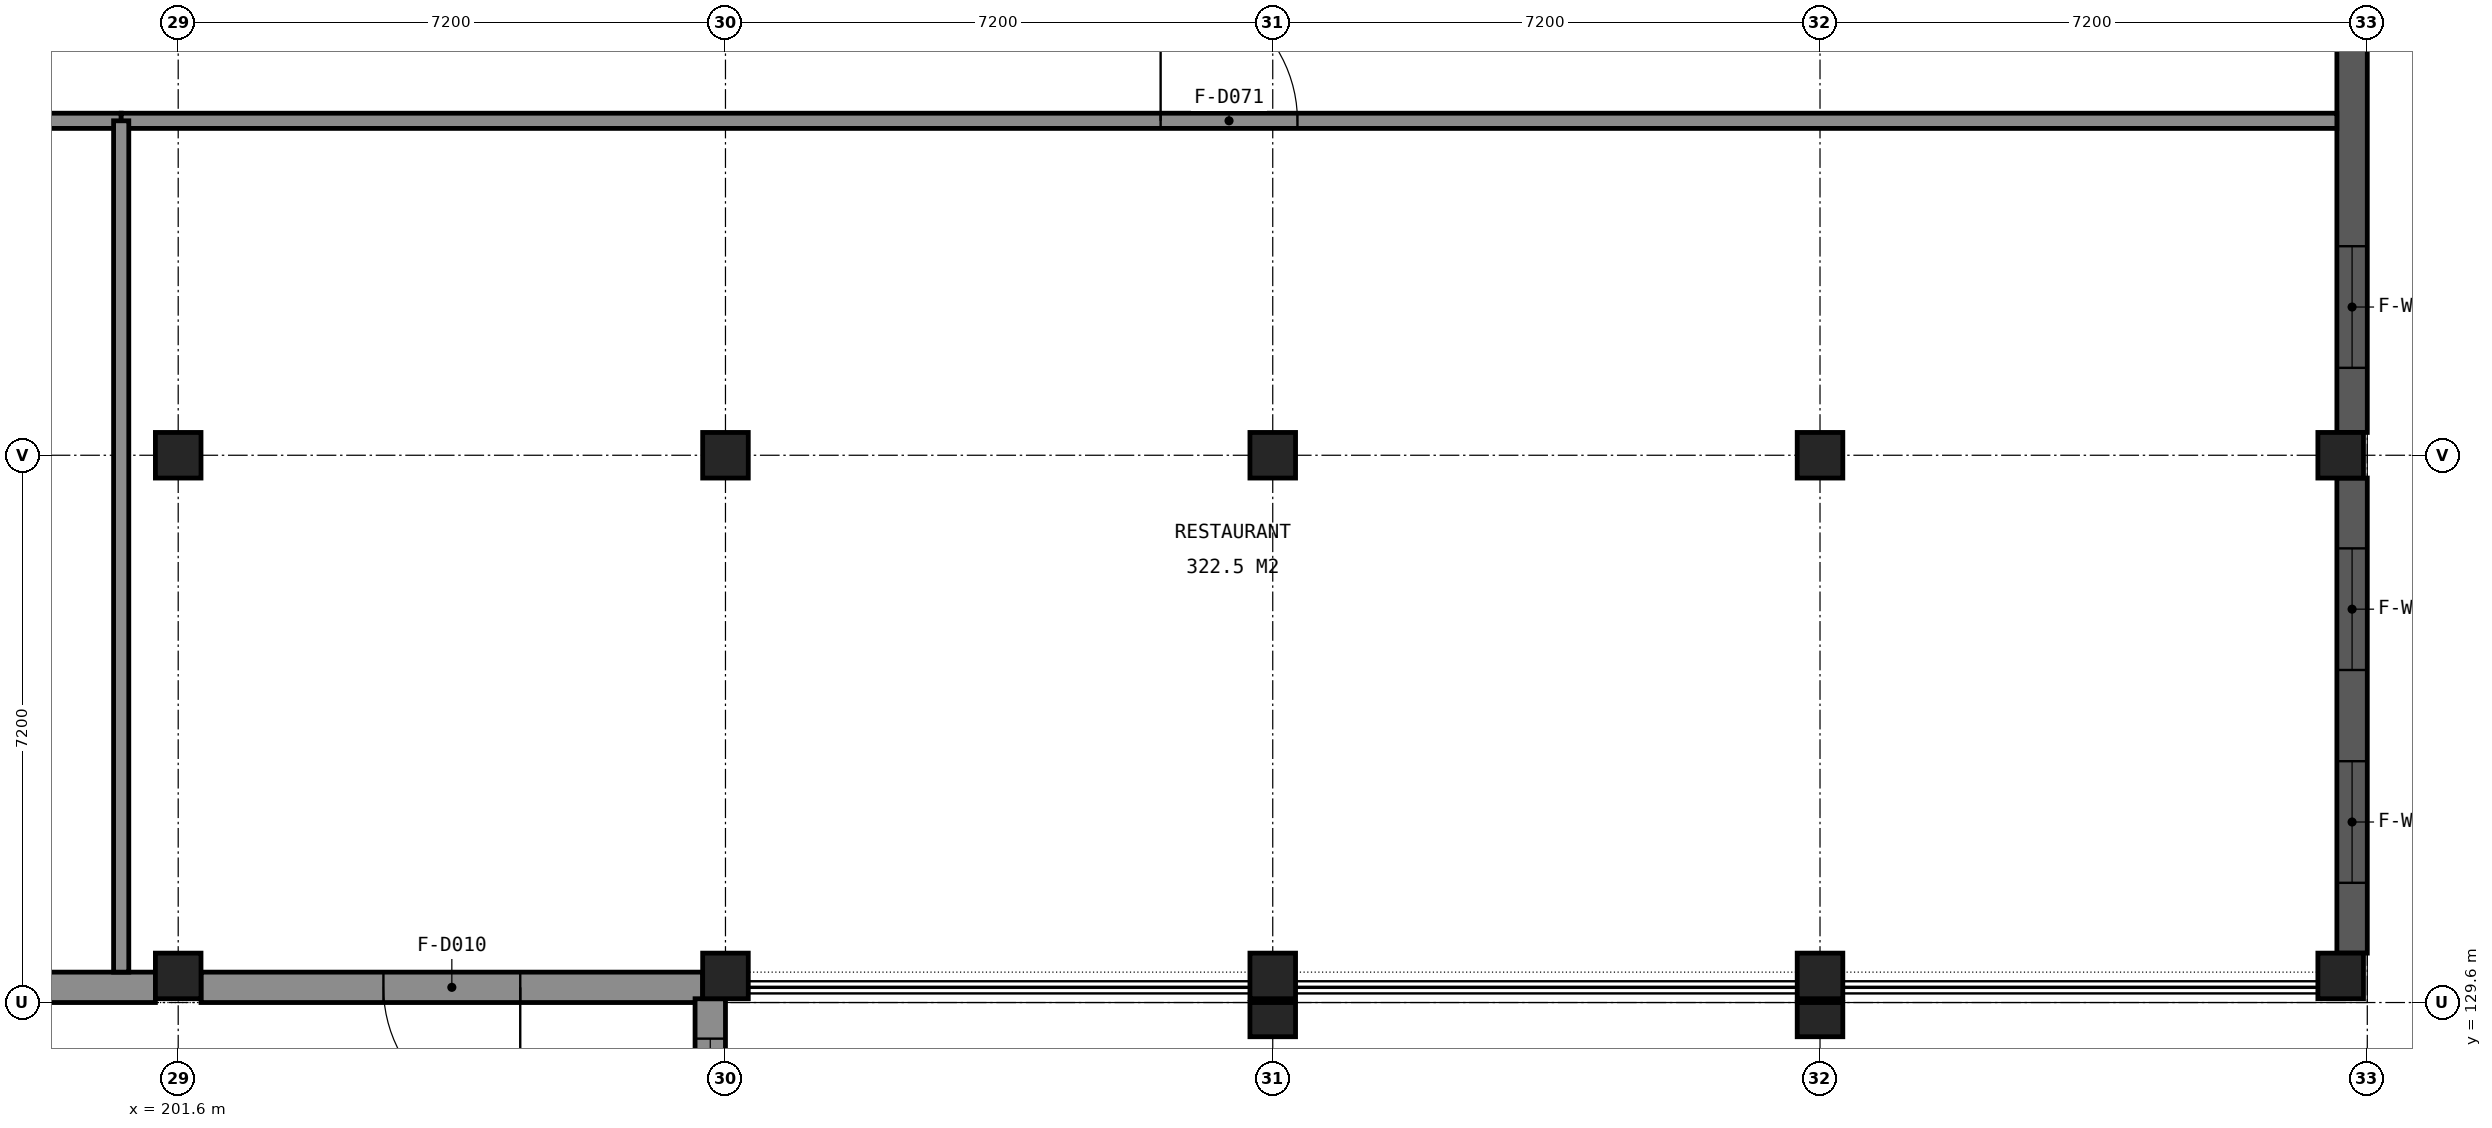
"""IFC4 building model, lengths in metres.
Left out: names, types, materials, properties, quantities, classifications, styles, units other than length and angle.
Written with IfcOpenShell. Run it as: python <this file> out.ifc"""

import sys

from ifc_helpers import new_model, si_unit, direction, frame, frame_2d, origin, origin_2d, place, context, subcontext, project, spatial, rectangle, extrude, element, fill, save


model = new_model("IFC4")
c1 = context("Model", 3, precision=1e-05, world=origin(), true_north=direction((0.0, 1.0)))
c2 = subcontext(c1, "Body", "Model", "MODEL_VIEW")
j1 = project(units=[si_unit("LENGTHUNIT", "METRE"), si_unit("PLANEANGLEUNIT", "RADIAN")], contexts=[c1])
p1 = place(None, origin())
s1 = spatial("IfcSite", under=j1, at=p1, CompositionType="ELEMENT")
p2 = place(p1, origin())
s2 = spatial("IfcBuilding", under=s1, at=p2, CompositionType="ELEMENT")
p3 = place(p2, frame((0.0, 0.0, 9.6)))
s3 = spatial("IfcBuildingStorey", under=s2, at=p3, CompositionType="ELEMENT", Elevation=9.6)
for number, where, z_axis, x_axis in (
    (1, (201.6, 129.95, 0.0), (0.0, 0.0, 1.0), (1.0, 0.0, 0.0)),
    (2, (208.8, 129.95, 0.0), (0.0, 0.0, 1.0), (1.0, 0.0, 0.0)),
    (3, (216.0, 129.95, 0.0), (0.0, 0.0, 1.0), (1.0, 0.0, 0.0)),
    (4, (223.2, 129.95, 0.0), (0.0, 0.0, 1.0), (1.0, 0.0, 0.0)),
    (5, (230.05, 129.95, 0.0), (0.0, 0.0, 1.0), (1.0, 0.0, 0.0)),
    (6, (201.6, 136.8, 0.0), (0.0, 0.0, 1.0), (1.0, 0.0, 0.0)),
    (7, (208.8, 136.8, 0.0), (0.0, 0.0, 1.0), (1.0, 0.0, 0.0)),
    (8, (216.0, 136.8, 0.0), (0.0, 0.0, 1.0), (1.0, 0.0, 0.0)),
    (9, (223.2, 136.8, 0.0), (0.0, 0.0, 1.0), (1.0, 0.0, 0.0)),
    (10, (230.05, 136.8, 0.0), (0.0, 0.0, 1.0), (1.0, 0.0, 0.0)),
):
    element("IfcColumn", number, at=place(p3, frame(where, z_axis=z_axis, x_axis=x_axis)), inside=s3, PredefinedType="COLUMN", context=c2, shape_type="SweptSolid", body=[
        extrude(rectangle(XDim=0.6, YDim=0.6, at=origin_2d()), origin(), (0.0, 0.0, 1.0), 4.8),
    ])
p4 = place(p3, frame((201.3, 129.8, 0.0), z_axis=(0.0, 0.0, 1.0), x_axis=(-1.0, 0.0, 0.0)))
e11 = element("IfcWall", 11, at=p4, inside=s3, PredefinedType="SOLIDWALL", context=c2, shape_type="SweptSolid", body=[
    extrude(rectangle(XDim=6.6, YDim=0.4, at=frame_2d((3.3, 0.0))), origin(), (0.0, 0.0, 1.0), 3.95),
])
p5 = place(p4, frame((2.4, 0.0, 0.0)))
e12 = element("IfcOpeningElement", 12, at=p5, cuts=e11, PredefinedType="OPENING", context=c2, shape_type="SweptSolid", body=[
    extrude(rectangle(XDim=1.8, YDim=2.1, at=frame_2d((0.9, 1.05))), frame((0.0, 0.21, 0.0), z_axis=(0.0, -1.0, 0.0), x_axis=(1.0, 0.0, 0.0)), (0.0, 0.0, 1.0), 0.42),
])
p6 = place(p3, frame((208.5, 129.8, 0.0), z_axis=(0.0, 0.0, 1.0), x_axis=(-1.0, 0.0, 0.0)))
e13 = element("IfcWall", 13, at=p6, inside=s3, PredefinedType="SOLIDWALL", context=c2, shape_type="SweptSolid", body=[
    extrude(rectangle(XDim=6.6, YDim=0.4, at=frame_2d((3.3, 0.0))), origin(), (0.0, 0.0, 1.0), 3.95),
])
p7 = place(p6, frame((2.4, 0.0, 0.0)))
e14 = element("IfcOpeningElement", 14, at=p7, cuts=e13, PredefinedType="OPENING", context=c2, shape_type="SweptSolid", body=[
    extrude(rectangle(XDim=1.8, YDim=2.1, at=frame_2d((0.9, 1.05))), frame((0.0, 0.21, 0.0), z_axis=(0.0, -1.0, 0.0), x_axis=(1.0, 0.0, 0.0)), (0.0, 0.0, 1.0), 0.42),
])
p8 = place(p3, frame((230.2, 136.5, 0.0), z_axis=(0.0, 0.0, 1.0), x_axis=(0.0, -1.0, 0.0)))
e15 = element("IfcWall", 15, at=p8, inside=s3, PredefinedType="SHEAR", context=c2, shape_type="SweptSolid", body=[
    extrude(rectangle(XDim=6.25, YDim=0.4, at=frame_2d((3.125, 0.0))), origin(), (0.0, 0.0, 1.0), 3.95),
])
p9 = place(p8, frame((0.925, 0.0, 0.8)))
e16 = element("IfcOpeningElement", 16, at=p9, cuts=e15, PredefinedType="OPENING", context=c2, shape_type="SweptSolid", body=[
    extrude(rectangle(XDim=1.6, YDim=3.1, at=frame_2d((0.8, 1.55))), frame((0.0, 0.21, 0.0), z_axis=(0.0, -1.0, 0.0), x_axis=(1.0, 0.0, 0.0)), (0.0, 0.0, 1.0), 0.42),
])
p10 = place(p8, frame((3.725, 0.0, 0.8)))
e17 = element("IfcOpeningElement", 17, at=p10, cuts=e15, PredefinedType="OPENING", context=c2, shape_type="SweptSolid", body=[
    extrude(rectangle(XDim=1.6, YDim=3.1, at=frame_2d((0.8, 1.55))), frame((0.0, 0.21, 0.0), z_axis=(0.0, -1.0, 0.0), x_axis=(1.0, 0.0, 0.0)), (0.0, 0.0, 1.0), 0.42),
])
p11 = place(p3, frame((230.2, 143.2, 0.0), z_axis=(0.0, 0.0, 1.0), x_axis=(0.0, -1.0, 0.0)))
e18 = element("IfcWall", 18, at=p11, inside=s3, PredefinedType="SHEAR", context=c2, shape_type="SweptSolid", body=[
    extrude(rectangle(XDim=6.1, YDim=0.4, at=frame_2d((3.05, 0.0))), origin(), (0.0, 0.0, 1.0), 3.95),
])
p12 = place(p11, frame((3.65, 0.0, 0.8)))
e19 = element("IfcOpeningElement", 19, at=p12, cuts=e18, PredefinedType="OPENING", context=c2, shape_type="SweptSolid", body=[
    extrude(rectangle(XDim=1.6, YDim=3.1, at=frame_2d((0.8, 1.55))), frame((0.0, 0.21, 0.0), z_axis=(0.0, -1.0, 0.0), x_axis=(1.0, 0.0, 0.0)), (0.0, 0.0, 1.0), 0.42),
])
for number, where, z_axis, x_axis in (
    (20, (216.0, 129.375, 0.0), (0.0, 0.0, 1.0), (1.0, 0.0, 0.0)),
    (21, (223.2, 129.375, 0.0), (0.0, 0.0, 1.0), (1.0, 0.0, 0.0)),
):
    element("IfcColumn", number, at=place(p3, frame(where, z_axis=z_axis, x_axis=x_axis)), inside=s3, PredefinedType="PILASTER", context=c2, shape_type="SweptSolid", body=[
        extrude(rectangle(XDim=0.6, YDim=0.45, at=origin_2d()), origin(), (0.0, 0.0, 1.0), 4.8),
    ])
p13 = place(p3, frame((208.6, 129.65, 0.0), z_axis=(0.0, 0.0, 1.0), x_axis=(0.0, -1.0, 0.0)))
e22 = element("IfcWall", 22, at=p13, inside=s3, PredefinedType="SOLIDWALL", context=c2, shape_type="SweptSolid", body=[
    extrude(rectangle(XDim=2.65, YDim=0.4, at=frame_2d((1.325, 0.0))), origin(), (0.0, 0.0, 1.0), 4.55),
])
p14 = place(p13, frame((0.525, 0.0, 0.8)))
e23 = element("IfcOpeningElement", 23, at=p14, cuts=e22, PredefinedType="OPENING", context=c2, shape_type="SweptSolid", body=[
    extrude(rectangle(XDim=1.6, YDim=3.1, at=frame_2d((0.8, 1.55))), frame((0.0, 0.21, 0.0), z_axis=(0.0, -1.0, 0.0), x_axis=(1.0, 0.0, 0.0)), (0.0, 0.0, 1.0), 0.42),
])
p15 = place(p3, frame((158.8, 141.2, 0.0), z_axis=(0.0, 0.0, 1.0), x_axis=(1.0, 0.0, 0.0)))
e24 = element("IfcWall", 24, at=p15, inside=s3, PredefinedType="PARTITIONING", context=c2, shape_type="SweptSolid", body=[
    extrude(rectangle(XDim=42.05, YDim=0.2, at=frame_2d((21.025, 0.0))), origin(), (0.0, 0.0, 1.0), 3.95),
])
p16 = place(p15, frame((20.125, 0.0, 0.0)))
e25 = element("IfcOpeningElement", 25, at=p16, cuts=e24, PredefinedType="OPENING", context=c2, shape_type="SweptSolid", body=[
    extrude(rectangle(XDim=1.8, YDim=2.1, at=frame_2d((0.9, 1.05))), frame((0.0, 0.11, 0.0), z_axis=(0.0, -1.0, 0.0), x_axis=(1.0, 0.0, 0.0)), (0.0, 0.0, 1.0), 0.22),
])
p17 = place(p3, frame((200.85, 141.2, 0.0), z_axis=(0.0, 0.0, 1.0), x_axis=(1.0, 0.0, 0.0)))
e26 = element("IfcWall", 26, at=p17, inside=s3, PredefinedType="PARTITIONING", context=c2, shape_type="SweptSolid", body=[
    extrude(rectangle(XDim=29.15, YDim=0.2, at=frame_2d((14.575, 0.0))), origin(), (0.0, 0.0, 1.0), 3.95),
])
p18 = place(p17, frame((13.675, 0.0, 0.0)))
e27 = element("IfcOpeningElement", 27, at=p18, cuts=e26, PredefinedType="OPENING", context=c2, shape_type="SweptSolid", body=[
    extrude(rectangle(XDim=1.8, YDim=2.1, at=frame_2d((0.9, 1.05))), frame((0.0, 0.11, 0.0), z_axis=(0.0, -1.0, 0.0), x_axis=(1.0, 0.0, 0.0)), (0.0, 0.0, 1.0), 0.22),
])
p19 = place(p3, frame((200.85, 130.0, 0.0), z_axis=(0.0, 0.0, 1.0), x_axis=(0.0, 1.0, 0.0)))
e28 = element("IfcWall", 28, at=p19, inside=s3, PredefinedType="PARTITIONING", context=c2, shape_type="SweptSolid", body=[
    extrude(rectangle(XDim=11.2, YDim=0.2, at=frame_2d((5.6, 0.0))), origin(), (0.0, 0.0, 1.0), 3.95),
])
p20 = place(p7, origin())
e29 = element("IfcDoor", 29, at=p20, inside=s3, OperationType="NOTDEFINED", PredefinedType="DOOR", context=c2, shape_type="SweptSolid", body=[
    extrude(rectangle(XDim=1.8, YDim=2.1, at=frame_2d((0.9, 1.05))), frame((0.0, 0.025, 0.0), z_axis=(0.0, -1.0, 0.0), x_axis=(1.0, 0.0, 0.0)), (0.0, 0.0, 1.0), 0.05),
])
fill(e14, e29)
p21 = place(p9, origin())
e30 = element("IfcWindow", 30, at=p21, inside=s3, PartitioningType="SINGLE_PANEL", PredefinedType="WINDOW", context=c2, shape_type="SweptSolid", body=[
    extrude(rectangle(XDim=1.6, YDim=3.1, at=frame_2d((0.8, 1.55))), frame((0.0, -0.09, 0.0), z_axis=(0.0, -1.0, 0.0), x_axis=(1.0, 0.0, 0.0)), (0.0, 0.0, 1.0), 0.06),
])
fill(e16, e30)
p22 = place(p10, origin())
e31 = element("IfcWindow", 31, at=p22, inside=s3, PartitioningType="SINGLE_PANEL", PredefinedType="WINDOW", context=c2, shape_type="SweptSolid", body=[
    extrude(rectangle(XDim=1.6, YDim=3.1, at=frame_2d((0.8, 1.55))), frame((0.0, -0.09, 0.0), z_axis=(0.0, -1.0, 0.0), x_axis=(1.0, 0.0, 0.0)), (0.0, 0.0, 1.0), 0.06),
])
fill(e17, e31)
p23 = place(p12, origin())
e32 = element("IfcWindow", 32, at=p23, inside=s3, PartitioningType="SINGLE_PANEL", PredefinedType="WINDOW", context=c2, shape_type="SweptSolid", body=[
    extrude(rectangle(XDim=1.6, YDim=3.1, at=frame_2d((0.8, 1.55))), frame((0.0, -0.09, 0.0), z_axis=(0.0, -1.0, 0.0), x_axis=(1.0, 0.0, 0.0)), (0.0, 0.0, 1.0), 0.06),
])
fill(e19, e32)
p24 = place(p14, origin())
e33 = element("IfcWindow", 33, at=p24, inside=s3, PartitioningType="SINGLE_PANEL", PredefinedType="WINDOW", context=c2, shape_type="SweptSolid", body=[
    extrude(rectangle(XDim=1.6, YDim=3.1, at=frame_2d((0.8, 1.55))), frame((0.0, -0.09, 0.0), z_axis=(0.0, -1.0, 0.0), x_axis=(1.0, 0.0, 0.0)), (0.0, 0.0, 1.0), 0.06),
])
fill(e23, e33)
p25 = place(p18, origin())
e34 = element("IfcDoor", 34, at=p25, inside=s3, OperationType="NOTDEFINED", PredefinedType="DOOR", context=c2, shape_type="SweptSolid", body=[
    extrude(rectangle(XDim=1.8, YDim=2.1, at=frame_2d((0.9, 1.05))), frame((0.0, 0.025, 0.0), z_axis=(0.0, -1.0, 0.0), x_axis=(1.0, 0.0, 0.0)), (0.0, 0.0, 1.0), 0.05),
])
fill(e27, e34)
save(model, sys.argv[1])
